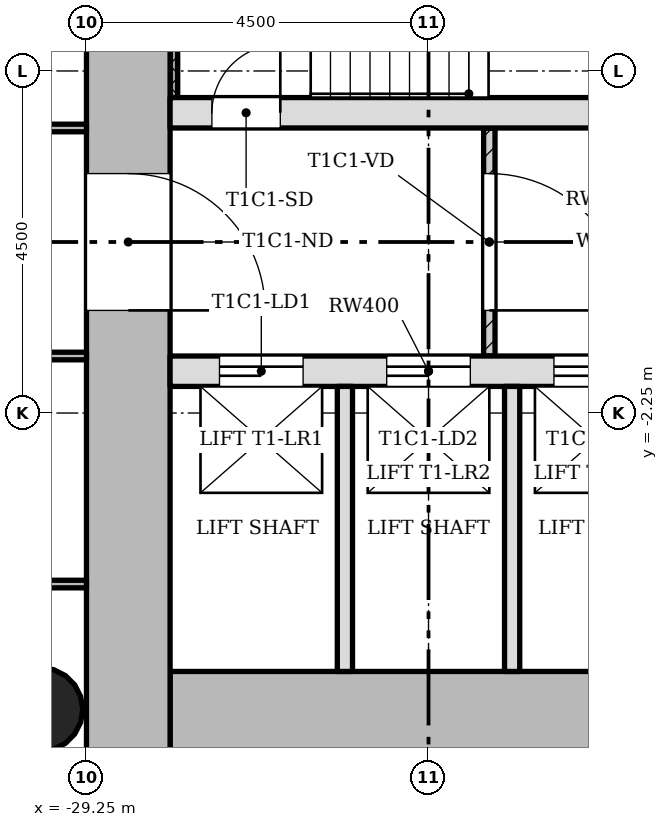
"""IFC4 building model, lengths in metres.
Left out: names, types, materials, properties, quantities, classifications, styles, units other than length and angle.
Written with IfcOpenShell. Run it as: python <this file> out.ifc"""

import sys

from ifc_helpers import new_model, si_unit, direction, frame, frame_2d, origin, origin_2d, place, context, subcontext, project, spatial, rectangle, hollow_circle, extrude, element, fill, save


model = new_model("IFC4")
c1 = context("Model", 3, precision=1e-05, world=origin(), true_north=direction((0.0, 1.0)))
c2 = subcontext(c1, "Body", "Model", "MODEL_VIEW")
j1 = project(units=[si_unit("LENGTHUNIT", "METRE"), si_unit("PLANEANGLEUNIT", "RADIAN")], contexts=[c1])
p1 = place(None, origin())
s1 = spatial("IfcSite", under=j1, at=p1, CompositionType="ELEMENT")
p2 = place(p1, origin())
s2 = spatial("IfcBuilding", under=s1, at=p2, CompositionType="ELEMENT")
p3 = place(p2, frame((0.0, 0.0, 68.7)))
s3 = spatial("IfcBuildingStorey", under=s2, at=p3, CompositionType="ELEMENT", Elevation=68.7)
p4 = place(p3, frame((-28.15, -6.2, 0.0), z_axis=(0.0, 0.0, 1.0), x_axis=(1.0, 0.0, 0.0)))
e1 = element("IfcWall", 1, at=p4, inside=s3, PredefinedType="SHEAR", context=c2, shape_type="SweptSolid", body=[
    extrude(rectangle(XDim=7.9, YDim=1.1, at=frame_2d((3.95, 0.0))), origin(), (0.0, 0.0, 1.0), 3.4),
])
p5 = place(p3, frame((-28.7, 5.65, 0.0), z_axis=(0.0, 0.0, 1.0), x_axis=(0.0, -1.0, 0.0)))
e2 = element("IfcWall", 2, at=p5, inside=s3, PredefinedType="SHEAR", context=c2, shape_type="SweptSolid", body=[
    extrude(rectangle(XDim=12.4, YDim=1.1, at=frame_2d((6.2, 0.0))), origin(), (0.0, 0.0, 1.0), 3.4),
])
p6 = place(p5, frame((4.75, 0.0, 0.0)))
e3 = element("IfcOpeningElement", 3, at=p6, cuts=e2, PredefinedType="OPENING", context=c2, shape_type="SweptSolid", body=[
    extrude(rectangle(XDim=1.8, YDim=2.1, at=frame_2d((0.9, 1.05))), frame((0.0, 0.56, 0.0), z_axis=(0.0, -1.0, 0.0), x_axis=(1.0, 0.0, 0.0)), (0.0, 0.0, 1.0), 1.12),
])
p7 = place(p3, frame((-28.15, -1.7, 0.0), z_axis=(0.0, 0.0, 1.0), x_axis=(1.0, 0.0, 0.0)))
e4 = element("IfcWall", 4, at=p7, inside=s3, PredefinedType="SHEAR", context=c2, shape_type="SweptSolid", body=[
    extrude(rectangle(XDim=6.8, YDim=0.4, at=frame_2d((3.4, 0.0))), origin(), (0.0, 0.0, 1.0), 3.4),
])
p8 = place(p7, frame((0.65, 0.0, 0.0)))
e5 = element("IfcOpeningElement", 5, at=p8, cuts=e4, PredefinedType="OPENING", context=c2, shape_type="SweptSolid", body=[
    extrude(rectangle(XDim=1.1, YDim=2.1, at=frame_2d((0.55, 1.05))), frame((0.0, 0.21, 0.0), z_axis=(0.0, -1.0, 0.0), x_axis=(1.0, 0.0, 0.0)), (0.0, 0.0, 1.0), 0.42),
])
p9 = place(p7, frame((2.85, 0.0, 0.0)))
e6 = element("IfcOpeningElement", 6, at=p9, cuts=e4, PredefinedType="OPENING", context=c2, shape_type="SweptSolid", body=[
    extrude(rectangle(XDim=1.1, YDim=2.1, at=frame_2d((0.55, 1.05))), frame((0.0, 0.21, 0.0), z_axis=(0.0, -1.0, 0.0), x_axis=(1.0, 0.0, 0.0)), (0.0, 0.0, 1.0), 0.42),
])
p10 = place(p7, frame((5.05, 0.0, 0.0)))
e7 = element("IfcOpeningElement", 7, at=p10, cuts=e4, PredefinedType="OPENING", context=c2, shape_type="SweptSolid", body=[
    extrude(rectangle(XDim=1.1, YDim=2.1, at=frame_2d((0.55, 1.05))), frame((0.0, 0.21, 0.0), z_axis=(0.0, -1.0, 0.0), x_axis=(1.0, 0.0, 0.0)), (0.0, 0.0, 1.0), 0.42),
])
p11 = place(p3, frame((-28.15, 1.7, 0.0), z_axis=(0.0, 0.0, 1.0), x_axis=(1.0, 0.0, 0.0)))
e8 = element("IfcWall", 8, at=p11, inside=s3, PredefinedType="SHEAR", context=c2, shape_type="SweptSolid", body=[
    extrude(rectangle(XDim=6.8, YDim=0.4, at=frame_2d((3.4, 0.0))), origin(), (0.0, 0.0, 1.0), 3.4),
])
p12 = place(p11, frame((0.55, 0.0, 0.0)))
e9 = element("IfcOpeningElement", 9, at=p12, cuts=e8, PredefinedType="OPENING", context=c2, shape_type="SweptSolid", body=[
    extrude(rectangle(XDim=0.9, YDim=2.1, at=frame_2d((0.45, 1.05))), frame((0.0, 0.21, 0.0), z_axis=(0.0, -1.0, 0.0), x_axis=(1.0, 0.0, 0.0)), (0.0, 0.0, 1.0), 0.42),
])
p13 = place(p3, frame((-29.85, -6.15, 0.0), z_axis=(0.0, 0.0, 1.0), x_axis=(1.0, 0.0, 0.0)))
e10 = element("IfcColumn", 10, at=p13, inside=s3, PredefinedType="COLUMN", context=c2, shape_type="SweptSolid", body=[
    extrude(hollow_circle(Radius=0.55, WallThickness=0.04, at=origin_2d()), origin(), (0.0, 0.0, 1.0), 3.4),
])
p14 = place(p3, frame((-23.95, -1.5, 0.0), z_axis=(0.0, 0.0, 1.0), x_axis=(0.0, 1.0, 0.0)))
e11 = element("IfcWall", 11, at=p14, inside=s3, PredefinedType="PARTITIONING", context=c2, shape_type="SweptSolid", body=[
    extrude(rectangle(XDim=3.0, YDim=0.15, at=frame_2d((1.5, 0.0))), origin(), (0.0, 0.0, 1.0), 3.0),
])
p15 = place(p14, frame((0.6, 0.0, 0.0)))
e12 = element("IfcOpeningElement", 12, at=p15, cuts=e11, PredefinedType="OPENING", context=c2, shape_type="SweptSolid", body=[
    extrude(rectangle(XDim=1.8, YDim=2.1, at=frame_2d((0.9, 1.05))), frame((0.0, 0.085, 0.0), z_axis=(0.0, -1.0, 0.0), x_axis=(1.0, 0.0, 0.0)), (0.0, 0.0, 1.0), 0.17),
])
for number, where, z_axis, x_axis in (
    (13, (-25.85, -5.65, 0.0), (0.0, 0.0, 1.0), (0.0, 1.0, 0.0)),
    (14, (-23.65, -5.65, 0.0), (0.0, 0.0, 1.0), (0.0, 1.0, 0.0)),
):
    element("IfcWall", number, at=place(p3, frame(where, z_axis=z_axis, x_axis=x_axis)), inside=s3, PredefinedType="SOLIDWALL", context=c2, shape_type="SweptSolid", body=[
        extrude(rectangle(XDim=3.75, YDim=0.2, at=frame_2d((1.875, 0.0))), origin(), (0.0, 0.0, 1.0), 3.0),
    ])
p16 = place(p3, frame((-35.1, -4.5, 0.0), z_axis=(0.0, 0.0, 1.0), x_axis=(1.0, 0.0, 0.0)))
e15 = element("IfcWall", 15, at=p16, inside=s3, PredefinedType="PARTITIONING", context=c2, shape_type="SweptSolid", body=[
    extrude(rectangle(XDim=5.85, YDim=0.1, at=frame_2d((2.925, 0.0))), origin(), (0.0, 0.0, 1.0), 3.0),
])
p17 = place(p3, frame((-35.1, -1.5, 0.0), z_axis=(0.0, 0.0, 1.0), x_axis=(1.0, 0.0, 0.0)))
e16 = element("IfcWall", 16, at=p17, inside=s3, PredefinedType="PARTITIONING", context=c2, shape_type="SweptSolid", body=[
    extrude(rectangle(XDim=5.85, YDim=0.1, at=frame_2d((2.925, 0.0))), origin(), (0.0, 0.0, 1.0), 3.0),
])
p18 = place(p17, frame((2.475, 0.0, 0.0)))
e17 = element("IfcOpeningElement", 17, at=p18, cuts=e16, PredefinedType="OPENING", context=c2, shape_type="SweptSolid", body=[
    extrude(rectangle(XDim=0.9, YDim=2.1, at=frame_2d((0.45, 1.05))), frame((0.0, 0.06, 0.0), z_axis=(0.0, -1.0, 0.0), x_axis=(1.0, 0.0, 0.0)), (0.0, 0.0, 1.0), 0.12),
])
p19 = place(p3, frame((-35.1, 1.5, 0.0), z_axis=(0.0, 0.0, 1.0), x_axis=(1.0, 0.0, 0.0)))
e18 = element("IfcWall", 18, at=p19, inside=s3, PredefinedType="PARTITIONING", context=c2, shape_type="SweptSolid", body=[
    extrude(rectangle(XDim=5.85, YDim=0.1, at=frame_2d((2.925, 0.0))), origin(), (0.0, 0.0, 1.0), 3.0),
])
p20 = place(p19, frame((3.675, 0.0, 0.0)))
e19 = element("IfcOpeningElement", 19, at=p20, cuts=e18, PredefinedType="OPENING", context=c2, shape_type="SweptSolid", body=[
    extrude(rectangle(XDim=0.9, YDim=2.1, at=frame_2d((0.45, 1.05))), frame((0.0, 0.06, 0.0), z_axis=(0.0, -1.0, 0.0), x_axis=(1.0, 0.0, 0.0)), (0.0, 0.0, 1.0), 0.12),
])
p21 = place(p3, frame((-28.1, 1.9, 0.0), z_axis=(0.0, 0.0, 1.0), x_axis=(0.0, 1.0, 0.0)))
e20 = element("IfcWall", 20, at=p21, inside=s3, PredefinedType="SHEAR", context=c2, shape_type="SweptSolid", body=[
    extrude(rectangle(XDim=3.75, YDim=0.1, at=frame_2d((1.875, 0.0))), origin(), (0.0, 0.0, 1.0), 3.4),
])
p22 = place(p15, origin())
e21 = element("IfcDoor", 21, at=p22, inside=s3, OperationType="SINGLE_SWING_LEFT", PredefinedType="DOOR", context=c2, shape_type="SweptSolid", body=[
    extrude(rectangle(XDim=1.8, YDim=2.1, at=frame_2d((0.9, 1.05))), frame((0.0, 0.025, 0.0), z_axis=(0.0, -1.0, 0.0), x_axis=(1.0, 0.0, 0.0)), (0.0, 0.0, 1.0), 0.05),
])
fill(e12, e21)
p23 = place(p12, origin())
e22 = element("IfcDoor", 22, at=p23, inside=s3, OperationType="SINGLE_SWING_LEFT", PredefinedType="DOOR", context=c2, shape_type="SweptSolid", body=[
    extrude(rectangle(XDim=0.9, YDim=2.1, at=frame_2d((0.45, 1.05))), frame((0.0, 0.025, 0.0), z_axis=(0.0, -1.0, 0.0), x_axis=(1.0, 0.0, 0.0)), (0.0, 0.0, 1.0), 0.05),
])
fill(e9, e22)
p24 = place(p8, origin())
e23 = element("IfcDoor", 23, at=p24, inside=s3, OperationType="SLIDING_TO_LEFT", PredefinedType="DOOR", context=c2, shape_type="SweptSolid", body=[
    extrude(rectangle(XDim=1.1, YDim=2.1, at=frame_2d((0.55, 1.05))), frame((0.0, 0.025, 0.0), z_axis=(0.0, -1.0, 0.0), x_axis=(1.0, 0.0, 0.0)), (0.0, 0.0, 1.0), 0.05),
])
fill(e5, e23)
p25 = place(p9, origin())
e24 = element("IfcDoor", 24, at=p25, inside=s3, OperationType="SLIDING_TO_LEFT", PredefinedType="DOOR", context=c2, shape_type="SweptSolid", body=[
    extrude(rectangle(XDim=1.1, YDim=2.1, at=frame_2d((0.55, 1.05))), frame((0.0, 0.025, 0.0), z_axis=(0.0, -1.0, 0.0), x_axis=(1.0, 0.0, 0.0)), (0.0, 0.0, 1.0), 0.05),
])
fill(e6, e24)
p26 = place(p10, origin())
e25 = element("IfcDoor", 25, at=p26, inside=s3, OperationType="SLIDING_TO_LEFT", PredefinedType="DOOR", context=c2, shape_type="SweptSolid", body=[
    extrude(rectangle(XDim=1.1, YDim=2.1, at=frame_2d((0.55, 1.05))), frame((0.0, 0.025, 0.0), z_axis=(0.0, -1.0, 0.0), x_axis=(1.0, 0.0, 0.0)), (0.0, 0.0, 1.0), 0.05),
])
fill(e7, e25)
p27 = place(p6, origin())
e26 = element("IfcDoor", 26, at=p27, inside=s3, OperationType="SINGLE_SWING_LEFT", PredefinedType="DOOR", context=c2, shape_type="SweptSolid", body=[
    extrude(rectangle(XDim=1.8, YDim=2.1, at=frame_2d((0.9, 1.05))), frame((0.0, 0.025, 0.0), z_axis=(0.0, -1.0, 0.0), x_axis=(1.0, 0.0, 0.0)), (0.0, 0.0, 1.0), 0.05),
])
fill(e3, e26)
save(model, sys.argv[1])
